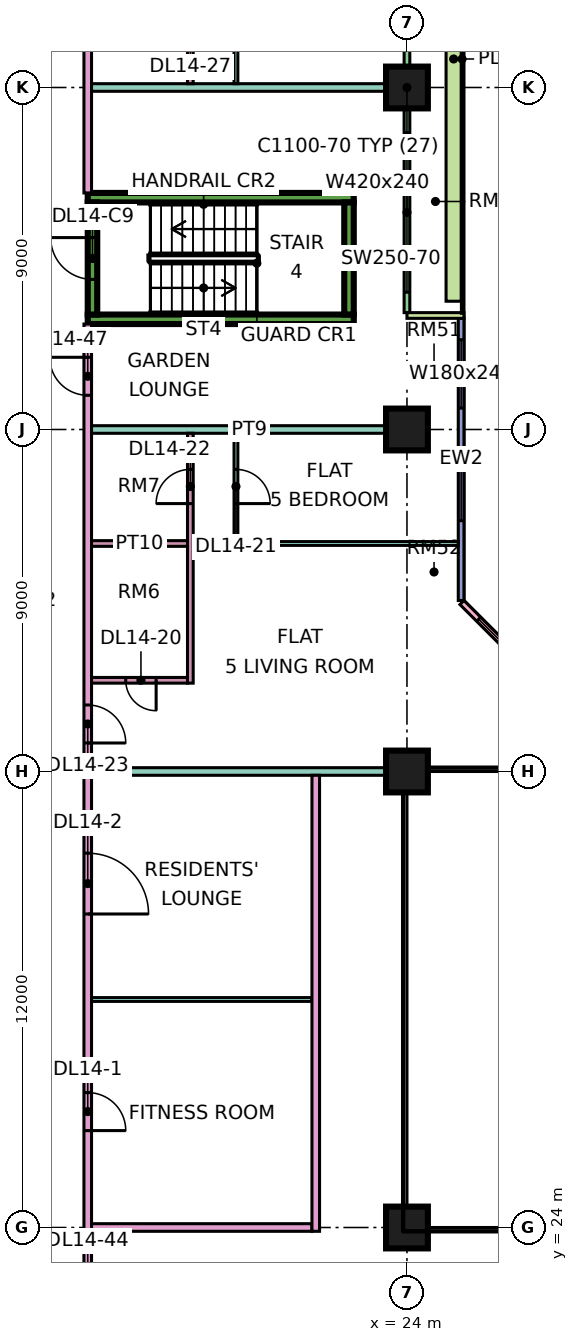
"""IFC4 building model, lengths in metres.
Left out: names, types, materials, properties, quantities, classifications, styles, units other than length and angle.
Written with IfcOpenShell. Run it as: python <this file> out.ifc"""

import sys

from ifc_helpers import new_model, si_unit, direction, frame, frame_2d, origin, origin_2d, place, context, subcontext, project, spatial, rectangle, extrude, element, fill, save


model = new_model("IFC4")
c1 = context("Model", 3, precision=1e-05, world=origin(), true_north=direction((0.0, 1.0)))
c2 = subcontext(c1, "Body", "Model", "MODEL_VIEW")
j1 = project(units=[si_unit("LENGTHUNIT", "METRE"), si_unit("PLANEANGLEUNIT", "RADIAN")], contexts=[c1])
p1 = place(None, origin())
s1 = spatial("IfcSite", under=j1, at=p1, CompositionType="ELEMENT")
p2 = place(p1, origin())
s2 = spatial("IfcBuilding", under=s1, at=p2, CompositionType="ELEMENT")
p3 = place(p2, frame((0.0, 0.0, 67.65)))
s3 = spatial("IfcBuildingStorey", under=s2, at=p3, CompositionType="ELEMENT", Elevation=67.65)
for number, where, z_axis, x_axis in (
    (1, (24.0, 24.0, 0.0), (0.0, 0.0, 1.0), (1.0, 0.0, 0.0)),
    (2, (24.0, 36.0, 0.0), (0.0, 0.0, 1.0), (1.0, 0.0, 0.0)),
    (3, (24.0, 45.0, 0.0), (0.0, 0.0, 1.0), (1.0, 0.0, 0.0)),
    (4, (24.0, 54.0, 0.0), (0.0, 0.0, 1.0), (1.0, 0.0, 0.0)),
):
    element("IfcColumn", number, at=place(p3, frame(where, z_axis=z_axis, x_axis=x_axis)), inside=s3, PredefinedType="COLUMN", context=c2, shape_type="SweptSolid", body=[
        extrude(rectangle(XDim=1.1, YDim=1.1, at=origin_2d()), origin(), (0.0, 0.0, 1.0), 3.75),
    ])
for number, where, z_axis, x_axis in (
    (5, (15.6, 47.9, 0.0), (0.0, 0.0, 1.0), (1.0, 0.0, 0.0)),
    (6, (15.6, 51.1, 0.0), (0.0, 0.0, 1.0), (1.0, 0.0, 0.0)),
):
    element("IfcWall", number, at=place(p3, frame(where, z_axis=z_axis, x_axis=x_axis)), inside=s3, PredefinedType="SHEAR", context=c2, shape_type="SweptSolid", body=[
        extrude(rectangle(XDim=7.0, YDim=0.25, at=frame_2d((3.5, 0.0))), origin(), (0.0, 0.0, 1.0), 3.75),
    ])
p4 = place(p3, frame((15.725, 48.025, 0.0), z_axis=(0.0, 0.0, 1.0), x_axis=(0.0, 1.0, 0.0)))
e7 = element("IfcWall", 7, at=p4, inside=s3, PredefinedType="SHEAR", context=c2, shape_type="SweptSolid", body=[
    extrude(rectangle(XDim=2.95, YDim=0.25, at=frame_2d((1.475, 0.0))), origin(), (0.0, 0.0, 1.0), 3.75),
])
p5 = place(p4, frame((0.925, 0.0, 0.0)))
e8 = element("IfcOpeningElement", 8, at=p5, cuts=e7, PredefinedType="OPENING", context=c2, shape_type="SweptSolid", body=[
    extrude(rectangle(XDim=1.1, YDim=2.2, at=frame_2d((0.55, 1.1))), frame((0.0, 0.135, 0.0), z_axis=(0.0, -1.0, 0.0), x_axis=(1.0, 0.0, 0.0)), (0.0, 0.0, 1.0), 0.27),
])
p6 = place(p3, frame((22.475, 48.025, 0.0), z_axis=(0.0, 0.0, 1.0), x_axis=(0.0, 1.0, 0.0)))
e9 = element("IfcWall", 9, at=p6, inside=s3, PredefinedType="SHEAR", context=c2, shape_type="SweptSolid", body=[
    extrude(rectangle(XDim=2.95, YDim=0.25, at=frame_2d((1.475, 0.0))), origin(), (0.0, 0.0, 1.0), 3.75),
])
p7 = place(p3, frame((28.447, 37.447, 0.0), z_axis=(0.0, 0.0, 1.0), x_axis=(-0.707106781187, 0.707106781187, 0.0)))
e10 = element("IfcWall", 10, at=p7, inside=s3, PredefinedType="SOLIDWALL", context=c2, shape_type="SweptSolid", body=[
    extrude(rectangle(XDim=4.243, YDim=0.15, at=frame_2d((2.121, 0.0))), origin(), (0.0, 0.0, 1.0), 3.35),
])
p8 = place(p7, frame((0.621, 0.0, 0.45)))
e11 = element("IfcOpeningElement", 11, at=p8, cuts=e10, PredefinedType="OPENING", context=c2, shape_type="SweptSolid", body=[
    extrude(rectangle(XDim=3.0, YDim=2.4, at=frame_2d((1.5, 1.2))), frame((0.0, 0.085, 0.0), z_axis=(0.0, -1.0, 0.0), x_axis=(1.0, 0.0, 0.0)), (0.0, 0.0, 1.0), 0.17),
])
p9 = place(p3, frame((25.425, 40.5, 0.0), z_axis=(0.0, 0.0, 1.0), x_axis=(0.0, 1.0, 0.0)))
e12 = element("IfcWall", 12, at=p9, inside=s3, PredefinedType="SOLIDWALL", context=c2, shape_type="SweptSolid", body=[
    extrude(rectangle(XDim=7.425, YDim=0.15, at=frame_2d((3.712, 0.0))), origin(), (0.0, 0.0, 1.0), 3.35),
])
p10 = place(p9, frame((2.1, 0.0, 0.45)))
e13 = element("IfcOpeningElement", 13, at=p10, cuts=e12, PredefinedType="OPENING", context=c2, shape_type="SweptSolid", body=[
    extrude(rectangle(XDim=1.8, YDim=2.4, at=frame_2d((0.9, 1.2))), frame((0.0, 0.085, 0.0), z_axis=(0.0, -1.0, 0.0), x_axis=(1.0, 0.0, 0.0)), (0.0, 0.0, 1.0), 0.17),
])
p11 = place(p9, frame((5.062, 0.0, 0.45)))
e14 = element("IfcOpeningElement", 14, at=p11, cuts=e12, PredefinedType="OPENING", context=c2, shape_type="SweptSolid", body=[
    extrude(rectangle(XDim=1.8, YDim=2.4, at=frame_2d((0.9, 1.2))), frame((0.0, 0.085, 0.0), z_axis=(0.0, -1.0, 0.0), x_axis=(1.0, 0.0, 0.0)), (0.0, 0.0, 1.0), 0.17),
])
p12 = place(p3, frame((24.0, 48.075, 0.0), z_axis=(0.0, 0.0, 1.0), x_axis=(0.0, 1.0, 0.0)))
e15 = element("IfcWall", 15, at=p12, inside=s3, PredefinedType="SOLIDWALL", context=c2, shape_type="SweptSolid", body=[
    extrude(rectangle(XDim=13.35, YDim=0.15, at=frame_2d((6.675, 0.0))), origin(), (0.0, 0.0, 1.0), 3.35),
])
p13 = place(p12, frame((0.538, 0.0, 0.45)))
e16 = element("IfcOpeningElement", 16, at=p13, cuts=e15, PredefinedType="OPENING", context=c2, shape_type="SweptSolid", body=[
    extrude(rectangle(XDim=4.2, YDim=2.4, at=frame_2d((2.1, 1.2))), frame((0.0, 0.085, 0.0), z_axis=(0.0, -1.0, 0.0), x_axis=(1.0, 0.0, 0.0)), (0.0, 0.0, 1.0), 0.17),
])
p14 = place(p12, frame((7.15, 0.0, 0.45)))
e17 = element("IfcOpeningElement", 17, at=p14, cuts=e15, PredefinedType="OPENING", context=c2, shape_type="SweptSolid", body=[
    extrude(rectangle(XDim=1.2, YDim=2.4, at=frame_2d((0.6, 1.2))), frame((0.0, 0.085, 0.0), z_axis=(0.0, -1.0, 0.0), x_axis=(1.0, 0.0, 0.0)), (0.0, 0.0, 1.0), 0.17),
])
p15 = place(p12, frame((9.525, 0.0, 0.0)))
e18 = element("IfcOpeningElement", 18, at=p15, cuts=e15, PredefinedType="OPENING", context=c2, shape_type="SweptSolid", body=[
    extrude(rectangle(XDim=1.8, YDim=2.4, at=frame_2d((0.9, 1.2))), frame((0.0, 0.085, 0.0), z_axis=(0.0, -1.0, 0.0), x_axis=(1.0, 0.0, 0.0)), (0.0, 0.0, 1.0), 0.17),
])
p16 = place(p3, frame((25.5, 48.0, 0.0), z_axis=(0.0, 0.0, 1.0), x_axis=(-1.0, 0.0, 0.0)))
e19 = element("IfcWall", 19, at=p16, inside=s3, PredefinedType="SOLIDWALL", context=c2, shape_type="SweptSolid", body=[
    extrude(rectangle(XDim=1.5, YDim=0.15, at=frame_2d((0.75, 0.0))), origin(), (0.0, 0.0, 1.0), 3.35),
])
p17 = place(p3, frame((25.229, 48.375, 0.0), z_axis=(0.0, 0.0, 1.0), x_axis=(0.0, 1.0, 0.0)))
e20 = element("IfcWall", 20, at=p17, inside=s3, PredefinedType="SOLIDWALL", context=c2, shape_type="SweptSolid", body=[
    extrude(rectangle(XDim=12.75, YDim=0.4, at=frame_2d((6.375, 0.0))), origin(), (0.0, 0.0, 1.0), 0.7),
])
p18 = place(p3, frame((15.6, 20.0, 0.0), z_axis=(0.0, 0.0, 1.0), x_axis=(0.0, 1.0, 0.0)))
e21 = element("IfcWall", 21, at=p18, inside=s3, PredefinedType="PARTITIONING", context=c2, shape_type="SweptSolid", body=[
    extrude(rectangle(XDim=27.775, YDim=0.2, at=frame_2d((13.887, 0.0))), origin(), (0.0, 0.0, 1.0), 3.35),
])
p19 = place(p18, frame((6.55, 0.0, 0.0)))
e22 = element("IfcOpeningElement", 22, at=p19, cuts=e21, PredefinedType="OPENING", context=c2, shape_type="SweptSolid", body=[
    extrude(rectangle(XDim=1.0, YDim=2.1, at=frame_2d((0.5, 1.05))), frame((0.0, 0.11, 0.0), z_axis=(0.0, -1.0, 0.0), x_axis=(1.0, 0.0, 0.0)), (0.0, 0.0, 1.0), 0.22),
])
p20 = place(p18, frame((12.25, 0.0, 0.0)))
e23 = element("IfcOpeningElement", 23, at=p20, cuts=e21, PredefinedType="OPENING", context=c2, shape_type="SweptSolid", body=[
    extrude(rectangle(XDim=1.6, YDim=2.1, at=frame_2d((0.8, 1.05))), frame((0.0, 0.11, 0.0), z_axis=(0.0, -1.0, 0.0), x_axis=(1.0, 0.0, 0.0)), (0.0, 0.0, 1.0), 0.22),
])
p21 = place(p18, frame((16.75, 0.0, 0.0)))
e24 = element("IfcOpeningElement", 24, at=p21, cuts=e21, PredefinedType="OPENING", context=c2, shape_type="SweptSolid", body=[
    extrude(rectangle(XDim=1.0, YDim=2.1, at=frame_2d((0.5, 1.05))), frame((0.0, 0.11, 0.0), z_axis=(0.0, -1.0, 0.0), x_axis=(1.0, 0.0, 0.0)), (0.0, 0.0, 1.0), 0.22),
])
p22 = place(p18, frame((1.15, 0.0, 0.0)))
e25 = element("IfcOpeningElement", 25, at=p22, cuts=e21, PredefinedType="OPENING", context=c2, shape_type="SweptSolid", body=[
    extrude(rectangle(XDim=1.8, YDim=2.1, at=frame_2d((0.9, 1.05))), frame((0.0, 0.11, 0.0), z_axis=(0.0, -1.0, 0.0), x_axis=(1.0, 0.0, 0.0)), (0.0, 0.0, 1.0), 0.22),
])
p23 = place(p18, frame((25.9, 0.0, 0.0)))
e26 = element("IfcOpeningElement", 26, at=p23, cuts=e21, PredefinedType="OPENING", context=c2, shape_type="SweptSolid", body=[
    extrude(rectangle(XDim=1.0, YDim=2.1, at=frame_2d((0.5, 1.05))), frame((0.0, 0.11, 0.0), z_axis=(0.0, -1.0, 0.0), x_axis=(1.0, 0.0, 0.0)), (0.0, 0.0, 1.0), 0.22),
])
p24 = place(p3, frame((15.6, 51.225, 0.0), z_axis=(0.0, 0.0, 1.0), x_axis=(0.0, 1.0, 0.0)))
e27 = element("IfcWall", 27, at=p24, inside=s3, PredefinedType="PARTITIONING", context=c2, shape_type="SweptSolid", body=[
    extrude(rectangle(XDim=13.125, YDim=0.2, at=frame_2d((6.562, 0.0))), origin(), (0.0, 0.0, 1.0), 3.35),
])
p25 = place(p24, frame((9.975, 0.0, 0.0)))
e28 = element("IfcOpeningElement", 28, at=p25, cuts=e27, PredefinedType="OPENING", context=c2, shape_type="SweptSolid", body=[
    extrude(rectangle(XDim=1.0, YDim=2.1, at=frame_2d((0.5, 1.05))), frame((0.0, 0.11, 0.0), z_axis=(0.0, -1.0, 0.0), x_axis=(1.0, 0.0, 0.0)), (0.0, 0.0, 1.0), 0.22),
])
p26 = place(p3, frame((15.7, 24.0, 0.0), z_axis=(0.0, 0.0, 1.0), x_axis=(1.0, 0.0, 0.0)))
e29 = element("IfcWall", 29, at=p26, inside=s3, PredefinedType="PARTITIONING", context=c2, shape_type="SweptSolid", body=[
    extrude(rectangle(XDim=5.8, YDim=0.2, at=frame_2d((2.9, 0.0))), origin(), (0.0, 0.0, 1.0), 3.35),
])
p27 = place(p3, frame((15.7, 30.0, 0.0), z_axis=(0.0, 0.0, 1.0), x_axis=(1.0, 0.0, 0.0)))
e30 = element("IfcWall", 30, at=p27, inside=s3, PredefinedType="PARTITIONING", context=c2, shape_type="SweptSolid", body=[
    extrude(rectangle(XDim=5.8, YDim=0.1, at=frame_2d((2.9, 0.0))), origin(), (0.0, 0.0, 1.0), 3.35),
])
p28 = place(p3, frame((15.7, 36.0, 0.0), z_axis=(0.0, 0.0, 1.0), x_axis=(1.0, 0.0, 0.0)))
e31 = element("IfcWall", 31, at=p28, inside=s3, PredefinedType="PARTITIONING", context=c2, shape_type="SweptSolid", body=[
    extrude(rectangle(XDim=8.3, YDim=0.2, at=frame_2d((4.15, 0.0))), origin(), (0.0, 0.0, 1.0), 3.35),
])
p29 = place(p3, frame((15.7, 38.4, 0.0), z_axis=(0.0, 0.0, 1.0), x_axis=(1.0, 0.0, 0.0)))
e32 = element("IfcWall", 32, at=p29, inside=s3, PredefinedType="PARTITIONING", context=c2, shape_type="SweptSolid", body=[
    extrude(rectangle(XDim=2.525, YDim=0.15, at=frame_2d((1.263, 0.0))), origin(), (0.0, 0.0, 1.0), 3.35),
])
p30 = place(p29, frame((0.9, 0.0, 0.0)))
e33 = element("IfcOpeningElement", 33, at=p30, cuts=e32, PredefinedType="OPENING", context=c2, shape_type="SweptSolid", body=[
    extrude(rectangle(XDim=0.8, YDim=2.1, at=frame_2d((0.4, 1.05))), frame((0.0, 0.085, 0.0), z_axis=(0.0, -1.0, 0.0), x_axis=(1.0, 0.0, 0.0)), (0.0, 0.0, 1.0), 0.17),
])
p31 = place(p3, frame((15.7, 42.0, 0.0), z_axis=(0.0, 0.0, 1.0), x_axis=(1.0, 0.0, 0.0)))
e34 = element("IfcWall", 34, at=p31, inside=s3, PredefinedType="PARTITIONING", context=c2, shape_type="SweptSolid", body=[
    extrude(rectangle(XDim=2.525, YDim=0.15, at=frame_2d((1.263, 0.0))), origin(), (0.0, 0.0, 1.0), 3.35),
])
p32 = place(p3, frame((15.7, 45.0, 0.0), z_axis=(0.0, 0.0, 1.0), x_axis=(1.0, 0.0, 0.0)))
e35 = element("IfcWall", 35, at=p32, inside=s3, PredefinedType="PARTITIONING", context=c2, shape_type="SweptSolid", body=[
    extrude(rectangle(XDim=8.3, YDim=0.2, at=frame_2d((4.15, 0.0))), origin(), (0.0, 0.0, 1.0), 3.35),
])
p33 = place(p3, frame((15.7, 54.0, 0.0), z_axis=(0.0, 0.0, 1.0), x_axis=(1.0, 0.0, 0.0)))
e36 = element("IfcWall", 36, at=p33, inside=s3, PredefinedType="PARTITIONING", context=c2, shape_type="SweptSolid", body=[
    extrude(rectangle(XDim=8.226, YDim=0.2, at=frame_2d((4.113, 0.0))), origin(), (0.0, 0.0, 1.0), 3.35),
])
p34 = place(p3, frame((18.3, 38.325, 0.0), z_axis=(0.0, 0.0, 1.0), x_axis=(0.0, 1.0, 0.0)))
e37 = element("IfcWall", 37, at=p34, inside=s3, PredefinedType="PARTITIONING", context=c2, shape_type="SweptSolid", body=[
    extrude(rectangle(XDim=6.575, YDim=0.15, at=frame_2d((3.288, 0.0))), origin(), (0.0, 0.0, 1.0), 3.35),
])
p35 = place(p34, frame((4.725, 0.0, 0.0)))
e38 = element("IfcOpeningElement", 38, at=p35, cuts=e37, PredefinedType="OPENING", context=c2, shape_type="SweptSolid", body=[
    extrude(rectangle(XDim=0.9, YDim=2.1, at=frame_2d((0.45, 1.05))), frame((0.0, 0.085, 0.0), z_axis=(0.0, -1.0, 0.0), x_axis=(1.0, 0.0, 0.0)), (0.0, 0.0, 1.0), 0.17),
])
p36 = place(p3, frame((18.3, 54.1, 0.0), z_axis=(0.0, 0.0, 1.0), x_axis=(0.0, 1.0, 0.0)))
e39 = element("IfcWall", 39, at=p36, inside=s3, PredefinedType="PARTITIONING", context=c2, shape_type="SweptSolid", body=[
    extrude(rectangle(XDim=6.275, YDim=0.15, at=frame_2d((3.137, 0.0))), origin(), (0.0, 0.0, 1.0), 3.35),
])
p37 = place(p36, frame((4.35, 0.0, 0.0)))
e40 = element("IfcOpeningElement", 40, at=p37, cuts=e39, PredefinedType="OPENING", context=c2, shape_type="SweptSolid", body=[
    extrude(rectangle(XDim=0.8, YDim=2.1, at=frame_2d((0.4, 1.05))), frame((0.0, 0.085, 0.0), z_axis=(0.0, -1.0, 0.0), x_axis=(1.0, 0.0, 0.0)), (0.0, 0.0, 1.0), 0.17),
])
p38 = place(p36, frame((1.1, 0.0, 0.0)))
e41 = element("IfcOpeningElement", 41, at=p38, cuts=e39, PredefinedType="OPENING", context=c2, shape_type="SweptSolid", body=[
    extrude(rectangle(XDim=0.9, YDim=2.1, at=frame_2d((0.45, 1.05))), frame((0.0, 0.085, 0.0), z_axis=(0.0, -1.0, 0.0), x_axis=(1.0, 0.0, 0.0)), (0.0, 0.0, 1.0), 0.17),
])
p39 = place(p3, frame((19.45, 42.0, 0.0), z_axis=(0.0, 0.0, 1.0), x_axis=(1.0, 0.0, 0.0)))
e42 = element("IfcWall", 42, at=p39, inside=s3, PredefinedType="PARTITIONING", context=c2, shape_type="SweptSolid", body=[
    extrude(rectangle(XDim=5.9, YDim=0.1, at=frame_2d((2.95, 0.0))), origin(), (0.0, 0.0, 1.0), 3.35),
])
p40 = place(p3, frame((19.5, 42.05, 0.0), z_axis=(0.0, 0.0, 1.0), x_axis=(0.0, 1.0, 0.0)))
e43 = element("IfcWall", 43, at=p40, inside=s3, PredefinedType="PARTITIONING", context=c2, shape_type="SweptSolid", body=[
    extrude(rectangle(XDim=2.85, YDim=0.1, at=frame_2d((1.425, 0.0))), origin(), (0.0, 0.0, 1.0), 3.35),
])
p41 = place(p40, frame((1.0, 0.0, 0.0)))
e44 = element("IfcOpeningElement", 44, at=p41, cuts=e43, PredefinedType="OPENING", context=c2, shape_type="SweptSolid", body=[
    extrude(rectangle(XDim=0.9, YDim=2.1, at=frame_2d((0.45, 1.05))), frame((0.0, 0.06, 0.0), z_axis=(0.0, -1.0, 0.0), x_axis=(1.0, 0.0, 0.0)), (0.0, 0.0, 1.0), 0.12),
])
p42 = place(p3, frame((19.5, 54.1, 0.0), z_axis=(0.0, 0.0, 1.0), x_axis=(0.0, 1.0, 0.0)))
e45 = element("IfcWall", 45, at=p42, inside=s3, PredefinedType="PARTITIONING", context=c2, shape_type="SweptSolid", body=[
    extrude(rectangle(XDim=5.95, YDim=0.1, at=frame_2d((2.975, 0.0))), origin(), (0.0, 0.0, 1.0), 3.35),
])
p43 = place(p42, frame((0.95, 0.0, 0.0)))
e46 = element("IfcOpeningElement", 46, at=p43, cuts=e45, PredefinedType="OPENING", context=c2, shape_type="SweptSolid", body=[
    extrude(rectangle(XDim=0.9, YDim=2.1, at=frame_2d((0.45, 1.05))), frame((0.0, 0.06, 0.0), z_axis=(0.0, -1.0, 0.0), x_axis=(1.0, 0.0, 0.0)), (0.0, 0.0, 1.0), 0.12),
])
p44 = place(p42, frame((3.95, 0.0, 0.0)))
e47 = element("IfcOpeningElement", 47, at=p44, cuts=e45, PredefinedType="OPENING", context=c2, shape_type="SweptSolid", body=[
    extrude(rectangle(XDim=0.9, YDim=2.1, at=frame_2d((0.45, 1.05))), frame((0.0, 0.06, 0.0), z_axis=(0.0, -1.0, 0.0), x_axis=(1.0, 0.0, 0.0)), (0.0, 0.0, 1.0), 0.12),
])
p45 = place(p3, frame((21.6, 23.9, 0.0), z_axis=(0.0, 0.0, 1.0), x_axis=(0.0, 1.0, 0.0)))
e48 = element("IfcWall", 48, at=p45, inside=s3, PredefinedType="PARTITIONING", context=c2, shape_type="SweptSolid", body=[
    extrude(rectangle(XDim=12.0, YDim=0.2, at=frame_2d((6.0, 0.0))), origin(), (0.0, 0.0, 1.0), 3.35),
])
p46 = place(p8, origin())
e49 = element("IfcWindow", 49, at=p46, inside=s3, PartitioningType="SINGLE_PANEL", PredefinedType="WINDOW", context=c2, shape_type="SweptSolid", body=[
    extrude(rectangle(XDim=3.0, YDim=2.4, at=frame_2d((1.5, 1.2))), frame((0.0, 0.03, 0.0), z_axis=(0.0, -1.0, 0.0), x_axis=(1.0, 0.0, 0.0)), (0.0, 0.0, 1.0), 0.06),
])
fill(e11, e49)
p47 = place(p10, origin())
e50 = element("IfcWindow", 50, at=p47, inside=s3, PartitioningType="SINGLE_PANEL", PredefinedType="WINDOW", context=c2, shape_type="SweptSolid", body=[
    extrude(rectangle(XDim=1.8, YDim=2.4, at=frame_2d((0.9, 1.2))), frame((0.0, 0.03, 0.0), z_axis=(0.0, -1.0, 0.0), x_axis=(1.0, 0.0, 0.0)), (0.0, 0.0, 1.0), 0.06),
])
fill(e13, e50)
p48 = place(p11, origin())
e51 = element("IfcWindow", 51, at=p48, inside=s3, PartitioningType="SINGLE_PANEL", PredefinedType="WINDOW", context=c2, shape_type="SweptSolid", body=[
    extrude(rectangle(XDim=1.8, YDim=2.4, at=frame_2d((0.9, 1.2))), frame((0.0, 0.03, 0.0), z_axis=(0.0, -1.0, 0.0), x_axis=(1.0, 0.0, 0.0)), (0.0, 0.0, 1.0), 0.06),
])
fill(e14, e51)
p49 = place(p13, origin())
e52 = element("IfcWindow", 52, at=p49, inside=s3, PartitioningType="SINGLE_PANEL", PredefinedType="WINDOW", context=c2, shape_type="SweptSolid", body=[
    extrude(rectangle(XDim=4.2, YDim=2.4, at=frame_2d((2.1, 1.2))), frame((0.0, 0.03, 0.0), z_axis=(0.0, -1.0, 0.0), x_axis=(1.0, 0.0, 0.0)), (0.0, 0.0, 1.0), 0.06),
])
fill(e16, e52)
p50 = place(p5, frame((1.1, 0.0, 0.0), z_axis=(0.0, 0.0, 1.0), x_axis=(-1.0, 0.0, 0.0)))
e53 = element("IfcDoor", 53, at=p50, inside=s3, OperationType="SINGLE_SWING_RIGHT", PredefinedType="DOOR", context=c2, shape_type="SweptSolid", body=[
    extrude(rectangle(XDim=1.1, YDim=2.2, at=frame_2d((0.55, 1.1))), frame((0.0, 0.025, 0.0), z_axis=(0.0, -1.0, 0.0), x_axis=(1.0, 0.0, 0.0)), (0.0, 0.0, 1.0), 0.05),
])
fill(e8, e53)
p51 = place(p19, frame((1.0, 0.0, 0.0), z_axis=(0.0, 0.0, 1.0), x_axis=(-1.0, 0.0, 0.0)))
e54 = element("IfcDoor", 54, at=p51, inside=s3, OperationType="SINGLE_SWING_LEFT", PredefinedType="DOOR", context=c2, shape_type="SweptSolid", body=[
    extrude(rectangle(XDim=1.0, YDim=2.1, at=frame_2d((0.5, 1.05))), frame((0.0, 0.025, 0.0), z_axis=(0.0, -1.0, 0.0), x_axis=(1.0, 0.0, 0.0)), (0.0, 0.0, 1.0), 0.05),
])
fill(e22, e54)
p52 = place(p20, frame((1.6, 0.0, 0.0), z_axis=(0.0, 0.0, 1.0), x_axis=(-1.0, 0.0, 0.0)))
e55 = element("IfcDoor", 55, at=p52, inside=s3, OperationType="DOUBLE_DOOR_SINGLE_SWING", PredefinedType="DOOR", context=c2, shape_type="SweptSolid", body=[
    extrude(rectangle(XDim=1.6, YDim=2.1, at=frame_2d((0.8, 1.05))), frame((0.0, 0.025, 0.0), z_axis=(0.0, -1.0, 0.0), x_axis=(1.0, 0.0, 0.0)), (0.0, 0.0, 1.0), 0.05),
])
fill(e23, e55)
p53 = place(p30, origin())
e56 = element("IfcDoor", 56, at=p53, inside=s3, OperationType="SINGLE_SWING_RIGHT", PredefinedType="DOOR", context=c2, shape_type="SweptSolid", body=[
    extrude(rectangle(XDim=0.8, YDim=2.1, at=frame_2d((0.4, 1.05))), frame((0.0, 0.025, 0.0), z_axis=(0.0, -1.0, 0.0), x_axis=(1.0, 0.0, 0.0)), (0.0, 0.0, 1.0), 0.05),
])
fill(e33, e56)
p54 = place(p41, frame((0.9, 0.0, 0.0), z_axis=(0.0, 0.0, 1.0), x_axis=(-1.0, 0.0, 0.0)))
e57 = element("IfcDoor", 57, at=p54, inside=s3, OperationType="SINGLE_SWING_LEFT", PredefinedType="DOOR", context=c2, shape_type="SweptSolid", body=[
    extrude(rectangle(XDim=0.9, YDim=2.1, at=frame_2d((0.45, 1.05))), frame((0.0, 0.025, 0.0), z_axis=(0.0, -1.0, 0.0), x_axis=(1.0, 0.0, 0.0)), (0.0, 0.0, 1.0), 0.05),
])
fill(e44, e57)
p55 = place(p35, origin())
e58 = element("IfcDoor", 58, at=p55, inside=s3, OperationType="SINGLE_SWING_LEFT", PredefinedType="DOOR", context=c2, shape_type="SweptSolid", body=[
    extrude(rectangle(XDim=0.9, YDim=2.1, at=frame_2d((0.45, 1.05))), frame((0.0, 0.025, 0.0), z_axis=(0.0, -1.0, 0.0), x_axis=(1.0, 0.0, 0.0)), (0.0, 0.0, 1.0), 0.05),
])
fill(e38, e58)
p56 = place(p21, frame((1.0, 0.0, 0.0), z_axis=(0.0, 0.0, 1.0), x_axis=(-1.0, 0.0, 0.0)))
e59 = element("IfcDoor", 59, at=p56, inside=s3, OperationType="SINGLE_SWING_LEFT", PredefinedType="DOOR", context=c2, shape_type="SweptSolid", body=[
    extrude(rectangle(XDim=1.0, YDim=2.1, at=frame_2d((0.5, 1.05))), frame((0.0, 0.025, 0.0), z_axis=(0.0, -1.0, 0.0), x_axis=(1.0, 0.0, 0.0)), (0.0, 0.0, 1.0), 0.05),
])
fill(e24, e59)
p57 = place(p23, frame((1.0, 0.0, 0.0), z_axis=(0.0, 0.0, 1.0), x_axis=(-1.0, 0.0, 0.0)))
e60 = element("IfcDoor", 60, at=p57, inside=s3, OperationType="SINGLE_SWING_RIGHT", PredefinedType="DOOR", context=c2, shape_type="SweptSolid", body=[
    extrude(rectangle(XDim=1.0, YDim=2.1, at=frame_2d((0.5, 1.05))), frame((0.0, 0.025, 0.0), z_axis=(0.0, -1.0, 0.0), x_axis=(1.0, 0.0, 0.0)), (0.0, 0.0, 1.0), 0.05),
])
fill(e26, e60)
save(model, sys.argv[1])
